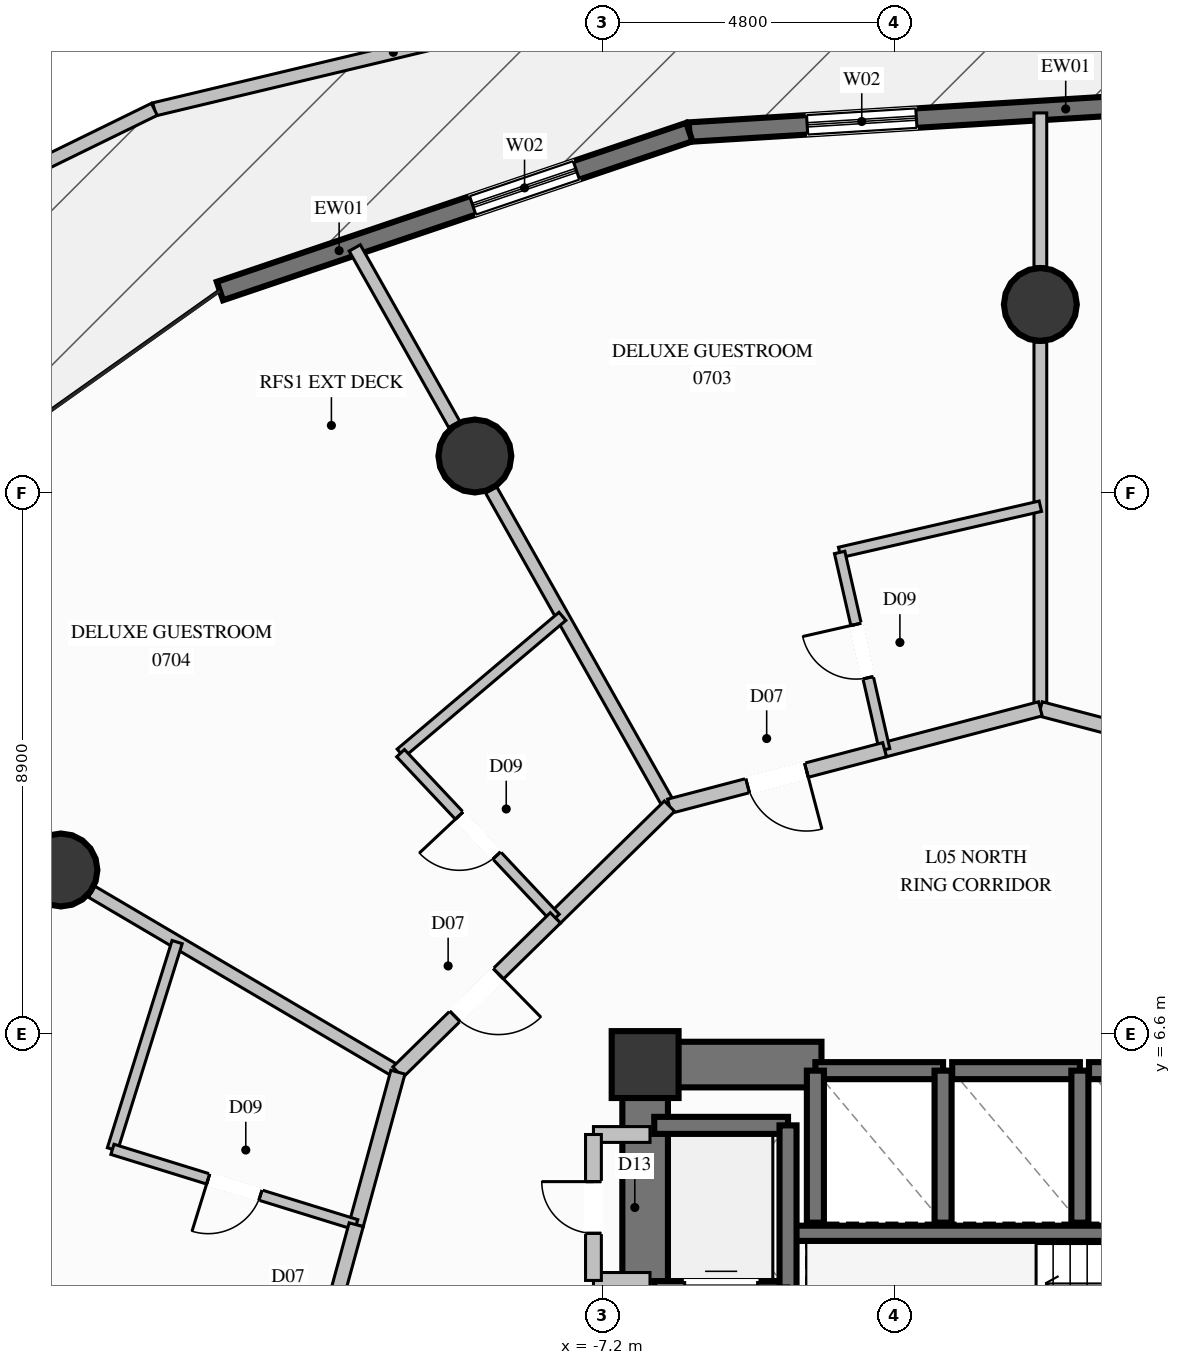
"""IFC4 building model, lengths in metres.
Left out: names, types, materials, properties, quantities, classifications, styles, units other than length and angle.
Written with IfcOpenShell. Run it as: python <this file> out.ifc"""

import sys

from ifc_helpers import new_model, si_unit, direction, frame, frame_2d, origin, origin_2d, place, context, subcontext, project, spatial, rectangle, circle, extrude, element, fill, save


model = new_model("IFC4")
c1 = context("Model", 3, precision=1e-05, world=origin(), true_north=direction((0.0, 1.0)))
c2 = subcontext(c1, "Body", "Model", "MODEL_VIEW")
j1 = project(units=[si_unit("LENGTHUNIT", "METRE"), si_unit("PLANEANGLEUNIT", "RADIAN")], contexts=[c1])
p1 = place(None, origin())
s1 = spatial("IfcSite", under=j1, at=p1, CompositionType="ELEMENT")
p2 = place(p1, origin())
s2 = spatial("IfcBuilding", under=s1, at=p2, CompositionType="ELEMENT")
p3 = place(p2, frame((0.0, 0.0, 28.4)))
s3 = spatial("IfcBuildingStorey", under=s2, at=p3, CompositionType="ELEMENT", Elevation=28.4)
p4 = place(p3, frame((-6.5, 6.1, 0.0), z_axis=(0.0, 0.0, 1.0), x_axis=(1.0, 0.0, 0.0)))
e1 = element("IfcColumn", 1, at=p4, inside=s3, PredefinedType="COLUMN", context=c2, shape_type="SweptSolid", body=[
    extrude(rectangle(XDim=1.1, YDim=1.1, at=origin_2d()), origin(), (0.0, 0.0, 1.0), 3.6),
])
p5 = place(p3, frame((-4.13, 3.325, 0.0), z_axis=(0.0, 0.0, 1.0), x_axis=(1.0, 0.0, 0.0)))
e2 = element("IfcWall", 2, at=p5, inside=s3, PredefinedType="SOLIDWALL", context=c2, shape_type="SweptSolid", body=[
    extrude(rectangle(XDim=8.26, YDim=0.25, at=frame_2d((4.13, 0.0))), origin(), (0.0, 0.0, 1.0), 3.6),
])
p6 = place(p3, frame((-6.125, 6.1, 0.0), z_axis=(0.0, 0.0, 1.0), x_axis=(1.0, 0.0, 0.0)))
e3 = element("IfcWall", 3, at=p6, inside=s3, PredefinedType="SHEAR", context=c2, shape_type="SweptSolid", body=[
    extrude(rectangle(XDim=2.525, YDim=0.75, at=frame_2d((1.262, 0.0))), origin(), (0.0, 0.0, 1.0), 3.6),
])
p7 = place(p3, frame((-6.5, 2.35, 0.0), z_axis=(0.0, 0.0, 1.0), x_axis=(0.0, 1.0, 0.0)))
e4 = element("IfcWall", 4, at=p7, inside=s3, PredefinedType="SHEAR", context=c2, shape_type="SweptSolid", body=[
    extrude(rectangle(XDim=4.125, YDim=0.75, at=frame_2d((2.062, 0.0))), origin(), (0.0, 0.0, 1.0), 3.6),
])
for number, where, z_axis, x_axis in (
    (5, (0.0, 18.6, 0.0), (0.0, 0.0, 1.0), (1.0, 0.0, 0.0)),
    (6, (-9.3, 16.108, 0.0), (0.0, 0.0, 1.0), (1.0, 0.0, 0.0)),
    (7, (-16.108, 9.3, 0.0), (0.0, 0.0, 1.0), (1.0, 0.0, 0.0)),
):
    element("IfcColumn", number, at=place(p3, frame(where, z_axis=z_axis, x_axis=x_axis)), inside=s3, PredefinedType="COLUMN", context=c2, shape_type="SweptSolid", body=[
        extrude(circle(Radius=0.6, at=origin_2d()), origin(), (0.0, 0.0, 1.0), 3.6),
    ])
p8 = place(p3, frame((-5.773, 21.435, 0.0), z_axis=(0.0, 0.0, 1.0), x_axis=(0.998117750792, 0.06132663005, 0.0)))
e8 = element("IfcWall", 8, at=p8, inside=s3, PredefinedType="SOLIDWALL", context=c2, shape_type="SweptSolid", body=[
    extrude(rectangle(XDim=8.412, YDim=0.32, at=frame_2d((4.206, 0.0))), origin(), (0.0, 0.0, 1.0), 3.34),
])
p9 = place(p8, frame((1.941, 0.0, 0.35)))
e9 = element("IfcOpeningElement", 9, at=p9, cuts=e8, PredefinedType="OPENING", context=c2, shape_type="SweptSolid", body=[
    extrude(rectangle(XDim=1.8, YDim=2.6, at=frame_2d((0.9, 1.3))), frame((0.0, 0.17, 0.0), z_axis=(0.0, -1.0, 0.0), x_axis=(1.0, 0.0, 0.0)), (0.0, 0.0, 1.0), 0.34),
])
p10 = place(p3, frame((-13.493, 18.821, 0.0), z_axis=(0.0, 0.0, 1.0), x_axis=(0.94717495877, 0.320717317085, 0.0)))
e10 = element("IfcWall", 10, at=p10, inside=s3, PredefinedType="SOLIDWALL", context=c2, shape_type="SweptSolid", body=[
    extrude(rectangle(XDim=8.151, YDim=0.32, at=frame_2d((4.075, 0.0))), origin(), (0.0, 0.0, 1.0), 3.34),
])
p11 = place(p10, frame((4.389, 0.0, 0.35)))
e11 = element("IfcOpeningElement", 11, at=p11, cuts=e10, PredefinedType="OPENING", context=c2, shape_type="SweptSolid", body=[
    extrude(rectangle(XDim=1.8, YDim=2.6, at=frame_2d((0.9, 1.3))), frame((0.0, 0.17, 0.0), z_axis=(0.0, -1.0, 0.0), x_axis=(1.0, 0.0, 0.0)), (0.0, 0.0, 1.0), 0.34),
])
p12 = place(p3, frame((-6.711, 23.685, 0.0), z_axis=(0.0, 0.0, 1.0), x_axis=(-0.972686482299, -0.232122827727, 0.0)))
e12 = element("IfcWall", 12, at=p12, inside=s3, PredefinedType="PARAPET", context=c2, shape_type="SweptSolid", body=[
    extrude(rectangle(XDim=8.082, YDim=0.22, at=frame_2d((4.041, 0.0))), origin(), (0.0, 0.0, 1.0), 1.15),
])
p13 = place(p3, frame((-14.572, 21.809, 0.0), z_axis=(0.0, 0.0, 1.0), x_axis=(-0.898207066033, -0.439572595289, 0.0)))
e13 = element("IfcWall", 13, at=p13, inside=s3, PredefinedType="PARAPET", context=c2, shape_type="SweptSolid", body=[
    extrude(rectangle(XDim=7.646, YDim=0.22, at=frame_2d((3.823, 0.0))), origin(), (0.0, 0.0, 1.0), 1.15),
])
p14 = place(p3, frame((-1.6, 6.0, 0.0), z_axis=(0.0, 0.0, 1.0), x_axis=(-1.0, 0.0, 0.0)))
e14 = element("IfcWall", 14, at=p14, inside=s3, PredefinedType="SOLIDWALL", context=c2, shape_type="SweptSolid", body=[
    extrude(rectangle(XDim=2.1, YDim=0.28, at=frame_2d((1.05, 0.0))), origin(), (0.0, 0.0, 1.0), 3.34),
])
for number, where, z_axis, x_axis in (
    (15, (-3.7, 6.0, 0.0), (0.0, 0.0, 1.0), (0.0, -1.0, 0.0)),
    (16, (-1.6, 3.5, 0.0), (0.0, 0.0, 1.0), (0.0, 1.0, 0.0)),
):
    element("IfcWall", number, at=place(p3, frame(where, z_axis=z_axis, x_axis=x_axis)), inside=s3, PredefinedType="SOLIDWALL", context=c2, shape_type="SweptSolid", body=[
        extrude(rectangle(XDim=2.5, YDim=0.28, at=frame_2d((1.25, 0.0))), origin(), (0.0, 0.0, 1.0), 3.34),
    ])
p15 = place(p3, frame((0.65, 6.0, 0.0), z_axis=(0.0, 0.0, 1.0), x_axis=(-1.0, 0.0, 0.0)))
e17 = element("IfcWall", 17, at=p15, inside=s3, PredefinedType="SOLIDWALL", context=c2, shape_type="SweptSolid", body=[
    extrude(rectangle(XDim=2.1, YDim=0.28, at=frame_2d((1.05, 0.0))), origin(), (0.0, 0.0, 1.0), 3.34),
])
p16 = place(p3, frame((0.65, 3.5, 0.0), z_axis=(0.0, 0.0, 1.0), x_axis=(0.0, 1.0, 0.0)))
e18 = element("IfcWall", 18, at=p16, inside=s3, PredefinedType="SOLIDWALL", context=c2, shape_type="SweptSolid", body=[
    extrude(rectangle(XDim=2.5, YDim=0.28, at=frame_2d((1.25, 0.0))), origin(), (0.0, 0.0, 1.0), 3.34),
])
p17 = place(p3, frame((3.0, 6.0, 0.0), z_axis=(0.0, 0.0, 1.0), x_axis=(-1.0, 0.0, 0.0)))
e19 = element("IfcWall", 19, at=p17, inside=s3, PredefinedType="SOLIDWALL", context=c2, shape_type="SweptSolid", body=[
    extrude(rectangle(XDim=2.2, YDim=0.28, at=frame_2d((1.1, 0.0))), origin(), (0.0, 0.0, 1.0), 3.34),
])
p18 = place(p3, frame((-6.35, 2.4, 0.0), z_axis=(0.0, 0.0, 1.0), x_axis=(1.0, 0.0, 0.0)))
e20 = element("IfcWall", 20, at=p18, inside=s3, PredefinedType="SOLIDWALL", context=c2, shape_type="SweptSolid", body=[
    extrude(rectangle(XDim=2.2, YDim=0.28, at=frame_2d((1.1, 0.0))), origin(), (0.0, 0.0, 1.0), 3.34),
])
p19 = place(p18, frame((0.5, 0.0, 0.0)))
e21 = element("IfcOpeningElement", 21, at=p19, cuts=e20, PredefinedType="OPENING", context=c2, shape_type="SweptSolid", body=[
    extrude(rectangle(XDim=1.2, YDim=2.2, at=frame_2d((0.6, 1.1))), frame((0.0, 0.15, 0.0), z_axis=(0.0, -1.0, 0.0), x_axis=(1.0, 0.0, 0.0)), (0.0, 0.0, 1.0), 0.3),
])
p20 = place(p3, frame((-4.15, 5.1, 0.0), z_axis=(0.0, 0.0, 1.0), x_axis=(-1.0, 0.0, 0.0)))
e22 = element("IfcWall", 22, at=p20, inside=s3, PredefinedType="SOLIDWALL", context=c2, shape_type="SweptSolid", body=[
    extrude(rectangle(XDim=2.2, YDim=0.28, at=frame_2d((1.1, 0.0))), origin(), (0.0, 0.0, 1.0), 3.34),
])
p21 = place(p3, frame((-4.15, 2.4, 0.0), z_axis=(0.0, 0.0, 1.0), x_axis=(0.0, 1.0, 0.0)))
e23 = element("IfcWall", 23, at=p21, inside=s3, PredefinedType="SOLIDWALL", context=c2, shape_type="SweptSolid", body=[
    extrude(rectangle(XDim=2.7, YDim=0.28, at=frame_2d((1.35, 0.0))), origin(), (0.0, 0.0, 1.0), 3.34),
])
for number, where, z_axis, x_axis in (
    (24, (-7.35, 4.95, 0.0), (0.0, 0.0, 1.0), (1.0, 0.0, 0.0)),
    (25, (-7.35, 2.55, 0.0), (0.0, 0.0, 1.0), (1.0, 0.0, 0.0)),
):
    element("IfcWall", number, at=place(p3, frame(where, z_axis=z_axis, x_axis=x_axis)), inside=s3, PredefinedType="PARTITIONING", context=c2, shape_type="SweptSolid", body=[
        extrude(rectangle(XDim=0.93, YDim=0.26, at=frame_2d((0.465, 0.0))), origin(), (0.0, 0.0, 1.0), 3.34),
    ])
p22 = place(p3, frame((-7.35, 2.55, 0.0), z_axis=(0.0, 0.0, 1.0), x_axis=(0.0, 1.0, 0.0)))
e26 = element("IfcWall", 26, at=p22, inside=s3, PredefinedType="PARTITIONING", context=c2, shape_type="SweptSolid", body=[
    extrude(rectangle(XDim=2.4, YDim=0.26, at=frame_2d((1.2, 0.0))), origin(), (0.0, 0.0, 1.0), 2.425),
])
p23 = place(p22, frame((0.775, 0.0, 0.0)))
e27 = element("IfcOpeningElement", 27, at=p23, cuts=e26, PredefinedType="OPENING", context=c2, shape_type="SweptSolid", body=[
    extrude(rectangle(XDim=0.85, YDim=2.05, at=frame_2d((0.425, 1.025))), frame((0.0, 0.14, 0.0), z_axis=(0.0, -1.0, 0.0), x_axis=(1.0, 0.0, 0.0)), (0.0, 0.0, 1.0), 0.28),
])
p24 = place(p3, frame((0.0, 11.95, 0.0), z_axis=(0.0, 0.0, 1.0), x_axis=(0.0, 1.0, 0.0)))
e28 = element("IfcWall", 28, at=p24, inside=s3, PredefinedType="PARTITIONING", context=c2, shape_type="SweptSolid", body=[
    extrude(rectangle(XDim=6.03, YDim=0.21, at=frame_2d((3.015, 0.0))), origin(), (0.0, 0.0, 1.0), 2.708),
])
p25 = place(p3, frame((0.0, 19.22, 0.0), z_axis=(0.0, 0.0, 1.0), x_axis=(0.0, 1.0, 0.0)))
e29 = element("IfcWall", 29, at=p25, inside=s3, PredefinedType="PARTITIONING", context=c2, shape_type="SweptSolid", body=[
    extrude(rectangle(XDim=2.53, YDim=0.21, at=frame_2d((1.265, 0.0))), origin(), (0.0, 0.0, 1.0), 3.34),
])
p26 = place(p3, frame((-6.1, 10.349, 0.0), z_axis=(0.0, 0.0, 1.0), x_axis=(-0.491140594116, 0.871080315936, 0.0)))
e30 = element("IfcWall", 30, at=p26, inside=s3, PredefinedType="PARTITIONING", context=c2, shape_type="SweptSolid", body=[
    extrude(rectangle(XDim=5.969, YDim=0.21, at=frame_2d((2.985, 0.0))), origin(), (0.0, 0.0, 1.0), 2.708),
])
p27 = place(p3, frame((-9.639, 16.627, 0.0), z_axis=(0.0, 0.0, 1.0), x_axis=(-0.491168715891, 0.871064459457, 0.0)))
e31 = element("IfcWall", 31, at=p27, inside=s3, PredefinedType="PARTITIONING", context=c2, shape_type="SweptSolid", body=[
    extrude(rectangle(XDim=3.333, YDim=0.21, at=frame_2d((1.667, 0.0))), origin(), (0.0, 0.0, 1.0), 3.34),
])
p28 = place(p3, frame((-10.566, 5.975, 0.0), z_axis=(0.0, 0.0, 1.0), x_axis=(-0.86160761681, 0.507574935014, 0.0)))
e32 = element("IfcWall", 32, at=p28, inside=s3, PredefinedType="PARTITIONING", context=c2, shape_type="SweptSolid", body=[
    extrude(rectangle(XDim=5.845, YDim=0.21, at=frame_2d((2.922, 0.0))), origin(), (0.0, 0.0, 1.0), 2.708),
])
p29 = place(p3, frame((3.538, 11.021, 0.0), z_axis=(0.0, 0.0, 1.0), x_axis=(-0.96721703222, 0.253951201187, 0.0)))
e33 = element("IfcWall", 33, at=p29, inside=s3, PredefinedType="PARTITIONING", context=c2, shape_type="SweptSolid", body=[
    extrude(rectangle(XDim=3.658, YDim=0.24, at=frame_2d((1.829, 0.0))), origin(), (0.0, 0.0, 1.0), 2.919),
])
p30 = place(p29, frame((1.329, 0.0, 0.0)))
e34 = element("IfcOpeningElement", 34, at=p30, cuts=e33, PredefinedType="OPENING", context=c2, shape_type="SweptSolid", body=[
    extrude(rectangle(XDim=1.0, YDim=2.2, at=frame_2d((0.5, 1.1))), frame((0.0, 0.13, 0.0), z_axis=(0.0, -1.0, 0.0), x_axis=(1.0, 0.0, 0.0)), (0.0, 0.0, 1.0), 0.26),
])
p31 = place(p3, frame((0.0, 11.95, 0.0), z_axis=(0.0, 0.0, 1.0), x_axis=(-0.967291490053, -0.253667446219, 0.0)))
e35 = element("IfcWall", 35, at=p31, inside=s3, PredefinedType="PARTITIONING", context=c2, shape_type="SweptSolid", body=[
    extrude(rectangle(XDim=2.649, YDim=0.24, at=frame_2d((1.324, 0.0))), origin(), (0.0, 0.0, 1.0), 2.919),
])
p32 = place(p3, frame((0.0, 15.282, 0.0), z_axis=(0.0, 0.0, 1.0), x_axis=(-0.974505253862, -0.224364681257, 0.0)))
e36 = element("IfcWall", 36, at=p32, inside=s3, PredefinedType="PLUMBINGWALL", context=c2, shape_type="SweptSolid", body=[
    extrude(rectangle(XDim=3.387, YDim=0.175, at=frame_2d((1.694, 0.0))), origin(), (0.0, 0.0, 1.0), 3.34),
])
p33 = place(p3, frame((-2.562, 11.278, 0.0), z_axis=(0.0, 0.0, 1.0), x_axis=(-0.222125372562, 0.97501811207, 0.0)))
e37 = element("IfcWall", 37, at=p33, inside=s3, PredefinedType="PLUMBINGWALL", context=c2, shape_type="SweptSolid", body=[
    extrude(rectangle(XDim=3.327, YDim=0.175, at=frame_2d((1.664, 0.0))), origin(), (0.0, 0.0, 1.0), 3.34),
])
p34 = place(p33, frame((1.214, 0.0, 0.0)))
e38 = element("IfcOpeningElement", 38, at=p34, cuts=e37, PredefinedType="OPENING", context=c2, shape_type="SweptSolid", body=[
    extrude(rectangle(XDim=0.9, YDim=2.1, at=frame_2d((0.45, 1.05))), frame((0.0, 0.098, 0.0), z_axis=(0.0, -1.0, 0.0), x_axis=(1.0, 0.0, 0.0)), (0.0, 0.0, 1.0), 0.195),
])
p35 = place(p3, frame((-2.562, 11.278, 0.0), z_axis=(0.0, 0.0, 1.0), x_axis=(-0.96721703222, -0.253951201187, 0.0)))
e39 = element("IfcWall", 39, at=p35, inside=s3, PredefinedType="PARTITIONING", context=c2, shape_type="SweptSolid", body=[
    extrude(rectangle(XDim=3.658, YDim=0.24, at=frame_2d((1.829, 0.0))), origin(), (0.0, 0.0, 1.0), 2.919),
])
p36 = place(p35, frame((1.329, 0.0, 0.0)))
e40 = element("IfcOpeningElement", 40, at=p36, cuts=e39, PredefinedType="OPENING", context=c2, shape_type="SweptSolid", body=[
    extrude(rectangle(XDim=1.0, YDim=2.2, at=frame_2d((0.5, 1.1))), frame((0.0, 0.13, 0.0), z_axis=(0.0, -1.0, 0.0), x_axis=(1.0, 0.0, 0.0)), (0.0, 0.0, 1.0), 0.26),
])
p37 = place(p3, frame((-6.1, 10.349, 0.0), z_axis=(0.0, 0.0, 1.0), x_axis=(-0.714460071513, -0.69967621527, 0.0)))
e41 = element("IfcWall", 41, at=p37, inside=s3, PredefinedType="PARTITIONING", context=c2, shape_type="SweptSolid", body=[
    extrude(rectangle(XDim=2.626, YDim=0.24, at=frame_2d((1.313, 0.0))), origin(), (0.0, 0.0, 1.0), 3.34),
])
p38 = place(p3, frame((-7.86, 13.471, 0.0), z_axis=(0.0, 0.0, 1.0), x_axis=(-0.763718302061, -0.645549653471, 0.0)))
e42 = element("IfcWall", 42, at=p38, inside=s3, PredefinedType="PLUMBINGWALL", context=c2, shape_type="SweptSolid", body=[
    extrude(rectangle(XDim=3.485, YDim=0.175, at=frame_2d((1.743, 0.0))), origin(), (0.0, 0.0, 1.0), 3.34),
])
p39 = place(p3, frame((-7.976, 8.512, 0.0), z_axis=(0.0, 0.0, 1.0), x_axis=(-0.684831906404, 0.72870107724, 0.0)))
e43 = element("IfcWall", 43, at=p39, inside=s3, PredefinedType="PLUMBINGWALL", context=c2, shape_type="SweptSolid", body=[
    extrude(rectangle(XDim=3.718, YDim=0.175, at=frame_2d((1.859, 0.0))), origin(), (0.0, 0.0, 1.0), 3.34),
])
p40 = place(p39, frame((1.409, 0.0, 0.0)))
e44 = element("IfcOpeningElement", 44, at=p40, cuts=e43, PredefinedType="OPENING", context=c2, shape_type="SweptSolid", body=[
    extrude(rectangle(XDim=0.9, YDim=2.1, at=frame_2d((0.45, 1.05))), frame((0.0, 0.098, 0.0), z_axis=(0.0, -1.0, 0.0), x_axis=(1.0, 0.0, 0.0)), (0.0, 0.0, 1.0), 0.195),
])
p41 = place(p3, frame((-7.976, 8.512, 0.0), z_axis=(0.0, 0.0, 1.0), x_axis=(-0.714375756875, -0.699762301064, 0.0)))
e45 = element("IfcWall", 45, at=p41, inside=s3, PredefinedType="PARTITIONING", context=c2, shape_type="SweptSolid", body=[
    extrude(rectangle(XDim=3.625, YDim=0.24, at=frame_2d((1.812, 0.0))), origin(), (0.0, 0.0, 1.0), 3.34),
])
p42 = place(p41, frame((1.313, 0.0, 0.0)))
e46 = element("IfcOpeningElement", 46, at=p42, cuts=e45, PredefinedType="OPENING", context=c2, shape_type="SweptSolid", body=[
    extrude(rectangle(XDim=1.0, YDim=2.2, at=frame_2d((0.5, 1.1))), frame((0.0, 0.13, 0.0), z_axis=(0.0, -1.0, 0.0), x_axis=(1.0, 0.0, 0.0)), (0.0, 0.0, 1.0), 0.26),
])
p43 = place(p3, frame((-10.566, 5.975, 0.0), z_axis=(0.0, 0.0, 1.0), x_axis=(-0.263744763784, -0.964592504416, 0.0)))
e47 = element("IfcWall", 47, at=p43, inside=s3, PredefinedType="PARTITIONING", context=c2, shape_type="SweptSolid", body=[
    extrude(rectangle(XDim=2.601, YDim=0.24, at=frame_2d((1.301, 0.0))), origin(), (0.0, 0.0, 1.0), 3.34),
])
p44 = place(p3, frame((-14.197, 8.114, 0.0), z_axis=(0.0, 0.0, 1.0), x_axis=(-0.298014103634, -0.954561466871, 0.0)))
e48 = element("IfcWall", 48, at=p44, inside=s3, PredefinedType="PLUMBINGWALL", context=c2, shape_type="SweptSolid", body=[
    extrude(rectangle(XDim=3.57, YDim=0.175, at=frame_2d((1.785, 0.0))), origin(), (0.0, 0.0, 1.0), 3.34),
])
p45 = place(p3, frame((-11.252, 3.466, 0.0), z_axis=(0.0, 0.0, 1.0), x_axis=(-0.955346516927, 0.295487787557, 0.0)))
e49 = element("IfcWall", 49, at=p45, inside=s3, PredefinedType="PLUMBINGWALL", context=c2, shape_type="SweptSolid", body=[
    extrude(rectangle(XDim=4.197, YDim=0.175, at=frame_2d((2.098, 0.0))), origin(), (0.0, 0.0, 1.0), 3.34),
])
p46 = place(p45, frame((1.648, 0.0, 0.0)))
e50 = element("IfcOpeningElement", 50, at=p46, cuts=e49, PredefinedType="OPENING", context=c2, shape_type="SweptSolid", body=[
    extrude(rectangle(XDim=0.9, YDim=2.1, at=frame_2d((0.45, 1.05))), frame((0.0, 0.098, 0.0), z_axis=(0.0, -1.0, 0.0), x_axis=(1.0, 0.0, 0.0)), (0.0, 0.0, 1.0), 0.195),
])
p47 = place(p3, frame((-11.252, 3.466, 0.0), z_axis=(0.0, 0.0, 1.0), x_axis=(-0.263818706543, -0.96457228349, 0.0)))
e51 = element("IfcWall", 51, at=p47, inside=s3, PredefinedType="PARTITIONING", context=c2, shape_type="SweptSolid", body=[
    extrude(rectangle(XDim=3.593, YDim=0.24, at=frame_2d((1.797, 0.0))), origin(), (0.0, 0.0, 1.0), 3.34),
])
p48 = place(p47, frame((1.297, 0.0, 0.0)))
e52 = element("IfcOpeningElement", 52, at=p48, cuts=e51, PredefinedType="OPENING", context=c2, shape_type="SweptSolid", body=[
    extrude(rectangle(XDim=1.0, YDim=2.2, at=frame_2d((0.5, 1.1))), frame((0.0, 0.13, 0.0), z_axis=(0.0, -1.0, 0.0), x_axis=(1.0, 0.0, 0.0)), (0.0, 0.0, 1.0), 0.26),
])
p49 = place(p9, origin())
e53 = element("IfcWindow", 53, at=p49, inside=s3, PartitioningType="SINGLE_PANEL", PredefinedType="WINDOW", context=c2, shape_type="SweptSolid", body=[
    extrude(rectangle(XDim=1.8, YDim=2.6, at=frame_2d((0.9, 1.3))), frame((0.0, 0.03, 0.0), z_axis=(0.0, -1.0, 0.0), x_axis=(1.0, 0.0, 0.0)), (0.0, 0.0, 1.0), 0.06),
])
fill(e9, e53)
p50 = place(p11, origin())
e54 = element("IfcWindow", 54, at=p50, inside=s3, PartitioningType="SINGLE_PANEL", PredefinedType="WINDOW", context=c2, shape_type="SweptSolid", body=[
    extrude(rectangle(XDim=1.8, YDim=2.6, at=frame_2d((0.9, 1.3))), frame((0.0, 0.03, 0.0), z_axis=(0.0, -1.0, 0.0), x_axis=(1.0, 0.0, 0.0)), (0.0, 0.0, 1.0), 0.06),
])
fill(e11, e54)
p51 = place(p23, origin())
e55 = element("IfcDoor", 55, at=p51, inside=s3, OperationType="SINGLE_SWING_RIGHT", PredefinedType="DOOR", context=c2, shape_type="SweptSolid", body=[
    extrude(rectangle(XDim=0.85, YDim=2.05, at=frame_2d((0.425, 1.025))), frame((0.0, 0.025, 0.0), z_axis=(0.0, -1.0, 0.0), x_axis=(1.0, 0.0, 0.0)), (0.0, 0.0, 1.0), 0.05),
])
fill(e27, e55)
p52 = place(p34, origin())
e56 = element("IfcDoor", 56, at=p52, inside=s3, OperationType="SINGLE_SWING_RIGHT", PredefinedType="DOOR", context=c2, shape_type="SweptSolid", body=[
    extrude(rectangle(XDim=0.9, YDim=2.1, at=frame_2d((0.45, 1.05))), frame((0.0, 0.025, 0.0), z_axis=(0.0, -1.0, 0.0), x_axis=(1.0, 0.0, 0.0)), (0.0, 0.0, 1.0), 0.05),
])
fill(e38, e56)
p53 = place(p36, origin())
e57 = element("IfcDoor", 57, at=p53, inside=s3, OperationType="SINGLE_SWING_LEFT", PredefinedType="DOOR", context=c2, shape_type="SweptSolid", body=[
    extrude(rectangle(XDim=1.0, YDim=2.2, at=frame_2d((0.5, 1.1))), frame((0.0, 0.025, 0.0), z_axis=(0.0, -1.0, 0.0), x_axis=(1.0, 0.0, 0.0)), (0.0, 0.0, 1.0), 0.05),
])
fill(e40, e57)
p54 = place(p40, origin())
e58 = element("IfcDoor", 58, at=p54, inside=s3, OperationType="SINGLE_SWING_RIGHT", PredefinedType="DOOR", context=c2, shape_type="SweptSolid", body=[
    extrude(rectangle(XDim=0.9, YDim=2.1, at=frame_2d((0.45, 1.05))), frame((0.0, 0.025, 0.0), z_axis=(0.0, -1.0, 0.0), x_axis=(1.0, 0.0, 0.0)), (0.0, 0.0, 1.0), 0.05),
])
fill(e44, e58)
p55 = place(p42, origin())
e59 = element("IfcDoor", 59, at=p55, inside=s3, OperationType="SINGLE_SWING_LEFT", PredefinedType="DOOR", context=c2, shape_type="SweptSolid", body=[
    extrude(rectangle(XDim=1.0, YDim=2.2, at=frame_2d((0.5, 1.1))), frame((0.0, 0.025, 0.0), z_axis=(0.0, -1.0, 0.0), x_axis=(1.0, 0.0, 0.0)), (0.0, 0.0, 1.0), 0.05),
])
fill(e46, e59)
p56 = place(p46, origin())
e60 = element("IfcDoor", 60, at=p56, inside=s3, OperationType="SINGLE_SWING_RIGHT", PredefinedType="DOOR", context=c2, shape_type="SweptSolid", body=[
    extrude(rectangle(XDim=0.9, YDim=2.1, at=frame_2d((0.45, 1.05))), frame((0.0, 0.025, 0.0), z_axis=(0.0, -1.0, 0.0), x_axis=(1.0, 0.0, 0.0)), (0.0, 0.0, 1.0), 0.05),
])
fill(e50, e60)
save(model, sys.argv[1])
